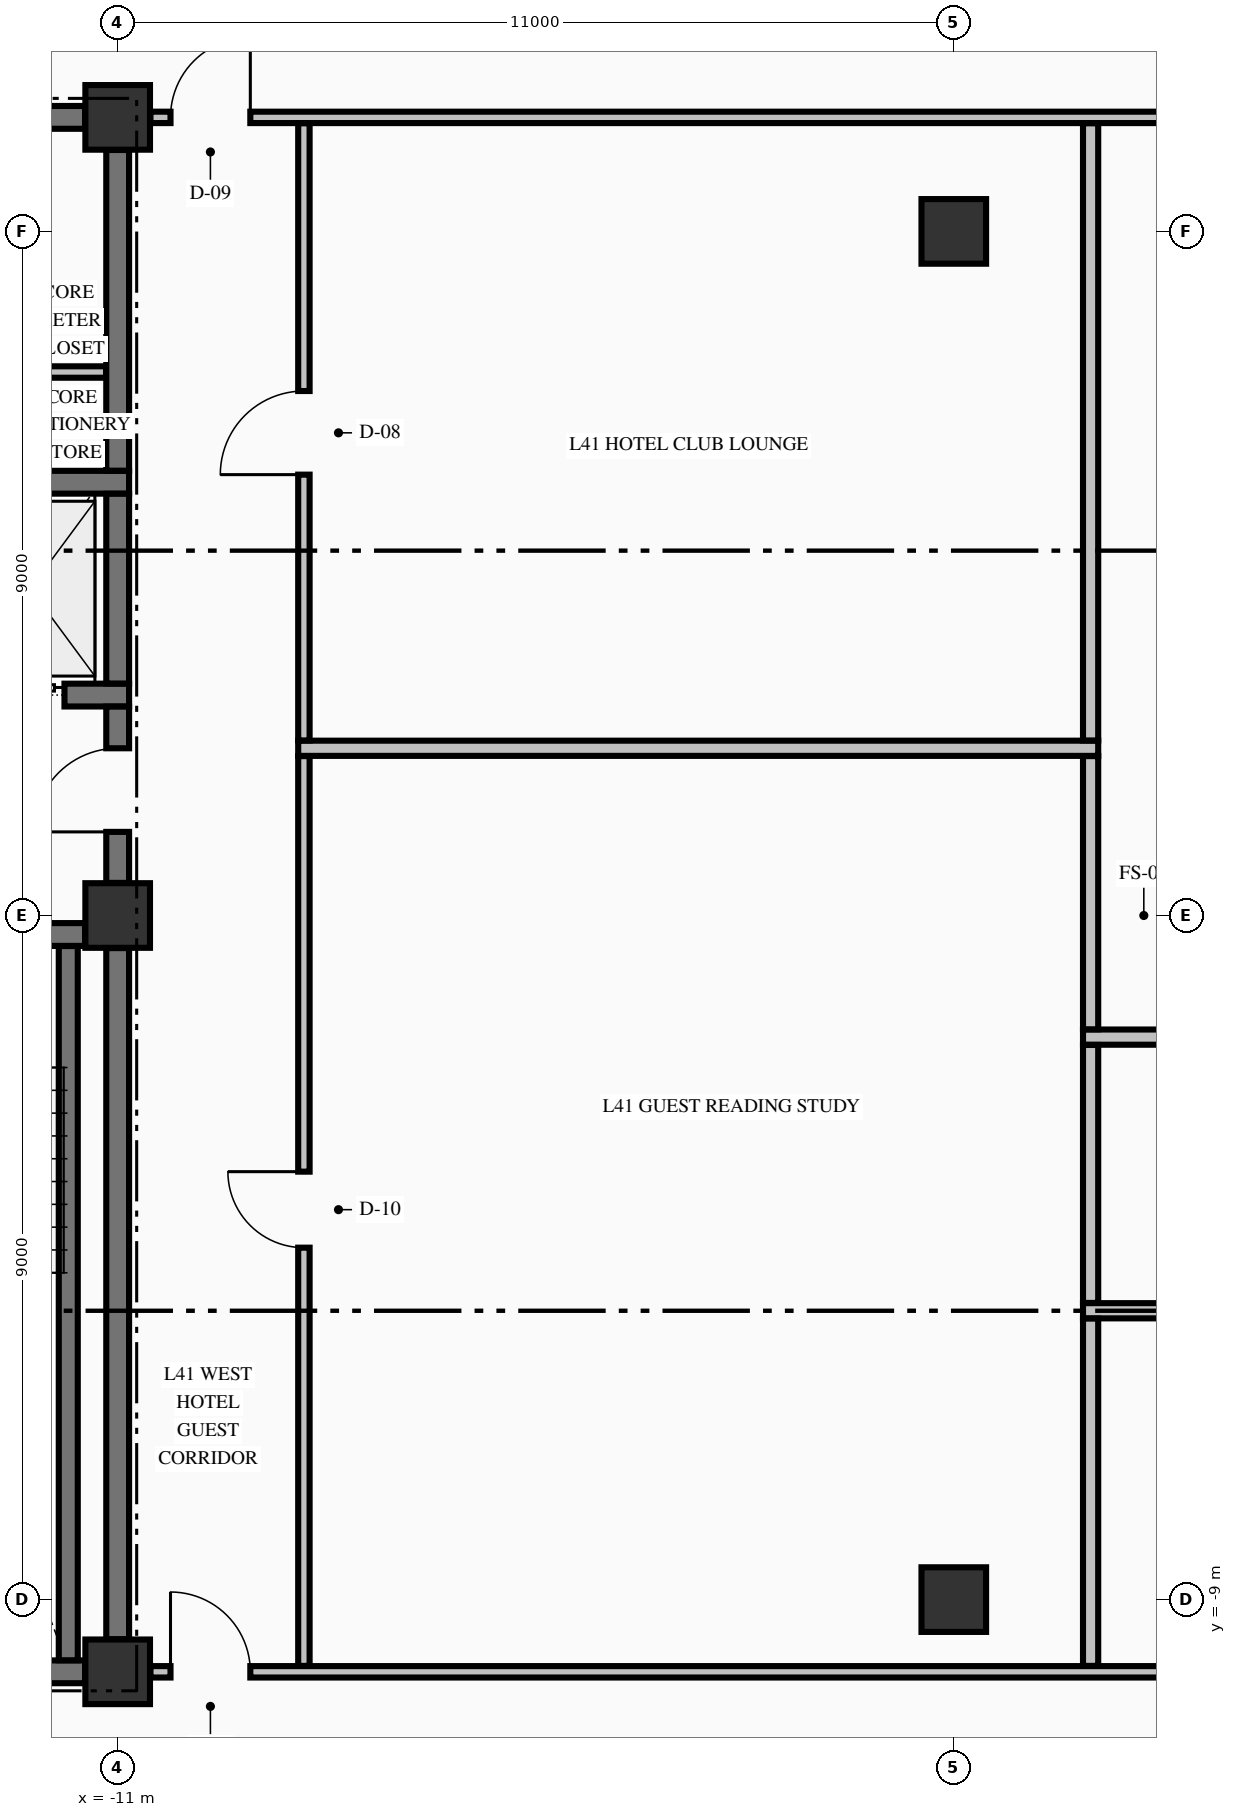
"""IFC4 building model, lengths in metres.
Left out: names, types, materials, properties, quantities, classifications, styles, units other than length and angle.
Written with IfcOpenShell. Run it as: python <this file> out.ifc"""

import sys

from ifc_helpers import new_model, si_unit, direction, frame, frame_2d, origin, origin_2d, place, context, subcontext, project, spatial, rectangle, extrude, element, fill, save


model = new_model("IFC4")
c1 = context("Model", 3, precision=1e-05, world=origin(), true_north=direction((0.0, 1.0)))
c2 = subcontext(c1, "Body", "Model", "MODEL_VIEW")
j1 = project(units=[si_unit("LENGTHUNIT", "METRE"), si_unit("PLANEANGLEUNIT", "RADIAN")], contexts=[c1])
p1 = place(None, origin())
s1 = spatial("IfcSite", under=j1, at=p1, CompositionType="ELEMENT")
p2 = place(p1, origin())
s2 = spatial("IfcBuilding", under=s1, at=p2, CompositionType="ELEMENT")
p3 = place(p2, frame((0.0, 0.0, 162.66)))
s3 = spatial("IfcBuildingStorey", under=s2, at=p3, CompositionType="ELEMENT", Elevation=162.66)
for number, where, z_axis, x_axis in (
    (1, (-11.0, -9.95, -0.25), (0.0, 0.0, 1.0), (1.0, 0.0, 0.0)),
    (2, (-11.0, 0.0, -0.25), (0.0, 0.0, 1.0), (1.0, 0.0, 0.0)),
    (3, (-11.0, 10.5, -0.25), (0.0, 0.0, 1.0), (1.0, 0.0, 0.0)),
    (4, (0.0, -9.0, -0.25), (0.0, 0.0, 1.0), (1.0, 0.0, 0.0)),
    (5, (0.0, 9.0, -0.25), (0.0, 0.0, 1.0), (1.0, 0.0, 0.0)),
):
    element("IfcColumn", number, at=place(p3, frame(where, z_axis=z_axis, x_axis=x_axis)), inside=s3, PredefinedType="COLUMN", context=c2, shape_type="SweptSolid", body=[
        extrude(rectangle(XDim=0.85, YDim=0.85, at=origin_2d()), origin(), (0.0, 0.0, 1.0), 3.4),
    ])
p4 = place(p3, frame((-14.7, -9.95, 0.0), z_axis=(0.0, 0.0, 1.0), x_axis=(1.0, 0.0, 0.0)))
e6 = element("IfcWall", 6, at=p4, inside=s3, PredefinedType="SHEAR", context=c2, shape_type="SweptSolid", body=[
    extrude(rectangle(XDim=3.271, YDim=0.3, at=frame_2d((1.635, 0.0))), origin(), (0.0, 0.0, 1.0), 3.15),
])
p5 = place(p3, frame((-19.571, -0.25, 0.0), z_axis=(0.0, 0.0, 1.0), x_axis=(1.0, 0.0, 0.0)))
e7 = element("IfcWall", 7, at=p5, inside=s3, PredefinedType="SHEAR", context=c2, shape_type="SweptSolid", body=[
    extrude(rectangle(XDim=8.142, YDim=0.3, at=frame_2d((4.071, 0.0))), origin(), (0.0, 0.0, 1.0), 3.15),
])
p6 = place(p5, frame((5.871, 0.0, 0.0)))
e8 = element("IfcOpeningElement", 8, at=p6, cuts=e7, PredefinedType="OPENING", context=c2, shape_type="SweptSolid", body=[
    extrude(rectangle(XDim=1.1, YDim=2.15, at=frame_2d((0.55, 1.075))), frame((0.0, 0.16, 0.0), z_axis=(0.0, -1.0, 0.0), x_axis=(1.0, 0.0, 0.0)), (0.0, 0.0, 1.0), 0.32),
])
p7 = place(p3, frame((-14.875, 2.9, 0.0), z_axis=(0.0, 0.0, 1.0), x_axis=(1.0, 0.0, 0.0)))
e9 = element("IfcWall", 9, at=p7, inside=s3, PredefinedType="SHEAR", context=c2, shape_type="SweptSolid", body=[
    extrude(rectangle(XDim=4.025, YDim=0.3, at=frame_2d((2.012, 0.0))), origin(), (0.0, 0.0, 1.0), 3.15),
])
p8 = place(p7, frame((2.075, 0.0, 0.0)))
e10 = element("IfcOpeningElement", 10, at=p8, cuts=e9, PredefinedType="OPENING", context=c2, shape_type="SweptSolid", body=[
    extrude(rectangle(XDim=1.1, YDim=2.2, at=frame_2d((0.55, 1.1))), frame((0.0, 0.16, 0.0), z_axis=(0.0, -1.0, 0.0), x_axis=(1.0, 0.0, 0.0)), (0.0, 0.0, 1.0), 0.32),
])
p9 = place(p3, frame((-14.875, 5.7, 0.0), z_axis=(0.0, 0.0, 1.0), x_axis=(1.0, 0.0, 0.0)))
e11 = element("IfcWall", 11, at=p9, inside=s3, PredefinedType="SHEAR", context=c2, shape_type="SweptSolid", body=[
    extrude(rectangle(XDim=4.025, YDim=0.3, at=frame_2d((2.012, 0.0))), origin(), (0.0, 0.0, 1.0), 3.15),
])
p10 = place(p3, frame((-14.7, 10.5, 0.0), z_axis=(0.0, 0.0, 1.0), x_axis=(1.0, 0.0, 0.0)))
e12 = element("IfcWall", 12, at=p10, inside=s3, PredefinedType="SHEAR", context=c2, shape_type="SweptSolid", body=[
    extrude(rectangle(XDim=3.271, YDim=0.3, at=frame_2d((1.635, 0.0))), origin(), (0.0, 0.0, 1.0), 3.15),
])
p11 = place(p10, frame((0.305, 0.0, 0.0)))
e13 = element("IfcOpeningElement", 13, at=p11, cuts=e12, PredefinedType="OPENING", context=c2, shape_type="SweptSolid", body=[
    extrude(rectangle(XDim=0.95, YDim=2.15, at=frame_2d((0.475, 1.075))), frame((0.0, 0.16, 0.0), z_axis=(0.0, -1.0, 0.0), x_axis=(1.0, 0.0, 0.0)), (0.0, 0.0, 1.0), 0.32),
])
p12 = place(p3, frame((-10.569, -9.95, 0.0), z_axis=(0.0, 0.0, 1.0), x_axis=(1.0, 0.0, 0.0)))
e14 = element("IfcWall", 14, at=p12, inside=s3, PredefinedType="PARTITIONING", context=c2, shape_type="SweptSolid", body=[
    extrude(rectangle(XDim=21.138, YDim=0.15, at=frame_2d((10.569, 0.0))), origin(), (0.0, 0.0, 1.0), 3.15),
])
p13 = place(p12, frame((0.264, 0.0, 0.0)))
e15 = element("IfcOpeningElement", 15, at=p13, cuts=e14, PredefinedType="OPENING", context=c2, shape_type="SweptSolid", body=[
    extrude(rectangle(XDim=1.05, YDim=2.15, at=frame_2d((0.525, 1.075))), frame((0.0, 0.085, 0.0), z_axis=(0.0, -1.0, 0.0), x_axis=(1.0, 0.0, 0.0)), (0.0, 0.0, 1.0), 0.17),
])
p14 = place(p12, frame((19.824, 0.0, 0.0)))
e16 = element("IfcOpeningElement", 16, at=p14, cuts=e14, PredefinedType="OPENING", context=c2, shape_type="SweptSolid", body=[
    extrude(rectangle(XDim=1.05, YDim=2.15, at=frame_2d((0.525, 1.075))), frame((0.0, 0.085, 0.0), z_axis=(0.0, -1.0, 0.0), x_axis=(1.0, 0.0, 0.0)), (0.0, 0.0, 1.0), 0.17),
])
p15 = place(p12, frame((13.774, 0.0, 0.0)))
e17 = element("IfcOpeningElement", 17, at=p15, cuts=e14, PredefinedType="OPENING", context=c2, shape_type="SweptSolid", body=[
    extrude(rectangle(XDim=0.95, YDim=2.15, at=frame_2d((0.475, 1.075))), frame((0.0, 0.085, 0.0), z_axis=(0.0, -1.0, 0.0), x_axis=(1.0, 0.0, 0.0)), (0.0, 0.0, 1.0), 0.17),
])
for number, where, z_axis, x_axis in (
    (18, (1.7, -5.2, 0.0), (0.0, 0.0, 1.0), (1.0, 0.0, 0.0)),
    (19, (1.7, -1.6, 0.0), (0.0, 0.0, 1.0), (1.0, 0.0, 0.0)),
):
    element("IfcWall", number, at=place(p3, frame(where, z_axis=z_axis, x_axis=x_axis)), inside=s3, PredefinedType="PARTITIONING", context=c2, shape_type="SweptSolid", body=[
        extrude(rectangle(XDim=6.925, YDim=0.2, at=frame_2d((3.462, 0.0))), origin(), (0.0, 0.0, 1.0), 3.15),
    ])
p16 = place(p3, frame((-8.625, 2.2, 0.0), z_axis=(0.0, 0.0, 1.0), x_axis=(1.0, 0.0, 0.0)))
e20 = element("IfcWall", 20, at=p16, inside=s3, PredefinedType="PARTITIONING", context=c2, shape_type="SweptSolid", body=[
    extrude(rectangle(XDim=10.525, YDim=0.2, at=frame_2d((5.262, 0.0))), origin(), (0.0, 0.0, 1.0), 3.15),
])
p17 = place(p3, frame((-13.225, 7.15, 0.0), z_axis=(0.0, 0.0, 1.0), x_axis=(1.0, 0.0, 0.0)))
e21 = element("IfcWall", 21, at=p17, inside=s3, PredefinedType="PARTITIONING", context=c2, shape_type="SweptSolid", body=[
    extrude(rectangle(XDim=2.072, YDim=0.15, at=frame_2d((1.036, 0.0))), origin(), (0.0, 0.0, 1.0), 3.15),
])
p18 = place(p3, frame((-10.569, 10.5, 0.0), z_axis=(0.0, 0.0, 1.0), x_axis=(1.0, 0.0, 0.0)))
e22 = element("IfcWall", 22, at=p18, inside=s3, PredefinedType="PARTITIONING", context=c2, shape_type="SweptSolid", body=[
    extrude(rectangle(XDim=21.138, YDim=0.15, at=frame_2d((10.569, 0.0))), origin(), (0.0, 0.0, 1.0), 3.15),
])
p19 = place(p18, frame((0.264, 0.0, 0.0)))
e23 = element("IfcOpeningElement", 23, at=p19, cuts=e22, PredefinedType="OPENING", context=c2, shape_type="SweptSolid", body=[
    extrude(rectangle(XDim=1.05, YDim=2.15, at=frame_2d((0.525, 1.075))), frame((0.0, 0.085, 0.0), z_axis=(0.0, -1.0, 0.0), x_axis=(1.0, 0.0, 0.0)), (0.0, 0.0, 1.0), 0.17),
])
p20 = place(p18, frame((19.824, 0.0, 0.0)))
e24 = element("IfcOpeningElement", 24, at=p20, cuts=e22, PredefinedType="OPENING", context=c2, shape_type="SweptSolid", body=[
    extrude(rectangle(XDim=1.05, YDim=2.15, at=frame_2d((0.525, 1.075))), frame((0.0, 0.085, 0.0), z_axis=(0.0, -1.0, 0.0), x_axis=(1.0, 0.0, 0.0)), (0.0, 0.0, 1.0), 0.17),
])
p21 = place(p3, frame((-11.65, -9.798, 0.0), z_axis=(0.0, 0.0, 1.0), x_axis=(0.0, 1.0, 0.0)))
e25 = element("IfcWall", 25, at=p21, inside=s3, PredefinedType="SOLIDWALL", context=c2, shape_type="SweptSolid", body=[
    extrude(rectangle(XDim=9.396, YDim=0.25, at=frame_2d((4.698, 0.0))), origin(), (0.0, 0.0, 1.0), 3.15),
])
p22 = place(p3, frame((-11.0, -9.521, 0.0), z_axis=(0.0, 0.0, 1.0), x_axis=(0.0, 1.0, 0.0)))
e26 = element("IfcWall", 26, at=p22, inside=s3, PredefinedType="SHEAR", context=c2, shape_type="SweptSolid", body=[
    extrude(rectangle(XDim=9.092, YDim=0.3, at=frame_2d((4.546, 0.0))), origin(), (0.0, 0.0, 1.0), 3.15),
])
p23 = place(p3, frame((-11.0, 0.429, 0.0), z_axis=(0.0, 0.0, 1.0), x_axis=(0.0, 1.0, 0.0)))
e27 = element("IfcWall", 27, at=p23, inside=s3, PredefinedType="SHEAR", context=c2, shape_type="SweptSolid", body=[
    extrude(rectangle(XDim=2.319, YDim=0.3, at=frame_2d((1.16, 0.0))), origin(), (0.0, 0.0, 1.0), 3.15),
])
p24 = place(p23, frame((0.671, 0.0, 0.0)))
e28 = element("IfcOpeningElement", 28, at=p24, cuts=e27, PredefinedType="OPENING", context=c2, shape_type="SweptSolid", body=[
    extrude(rectangle(XDim=1.1, YDim=2.15, at=frame_2d((0.55, 1.075))), frame((0.0, 0.16, 0.0), z_axis=(0.0, -1.0, 0.0), x_axis=(1.0, 0.0, 0.0)), (0.0, 0.0, 1.0), 0.32),
])
p25 = place(p3, frame((-11.0, 3.052, 0.0), z_axis=(0.0, 0.0, 1.0), x_axis=(0.0, 1.0, 0.0)))
e29 = element("IfcWall", 29, at=p25, inside=s3, PredefinedType="SHEAR", context=c2, shape_type="SweptSolid", body=[
    extrude(rectangle(XDim=2.496, YDim=0.3, at=frame_2d((1.248, 0.0))), origin(), (0.0, 0.0, 1.0), 3.15),
])
p26 = place(p3, frame((-11.0, 5.852, 0.0), z_axis=(0.0, 0.0, 1.0), x_axis=(0.0, 1.0, 0.0)))
e30 = element("IfcWall", 30, at=p26, inside=s3, PredefinedType="SHEAR", context=c2, shape_type="SweptSolid", body=[
    extrude(rectangle(XDim=4.219, YDim=0.3, at=frame_2d((2.109, 0.0))), origin(), (0.0, 0.0, 1.0), 3.15),
])
p27 = place(p3, frame((-8.55, -9.872, 0.0), z_axis=(0.0, 0.0, 1.0), x_axis=(0.0, 1.0, 0.0)))
e31 = element("IfcWall", 31, at=p27, inside=s3, PredefinedType="PARTITIONING", context=c2, shape_type="SweptSolid", body=[
    extrude(rectangle(XDim=11.969, YDim=0.15, at=frame_2d((5.984, 0.0))), origin(), (0.0, 0.0, 1.0), 3.15),
])
p28 = place(p27, frame((5.502, 0.0, 0.0)))
e32 = element("IfcOpeningElement", 32, at=p28, cuts=e31, PredefinedType="OPENING", context=c2, shape_type="SweptSolid", body=[
    extrude(rectangle(XDim=1.0, YDim=2.15, at=frame_2d((0.5, 1.075))), frame((0.0, 0.085, 0.0), z_axis=(0.0, -1.0, 0.0), x_axis=(1.0, 0.0, 0.0)), (0.0, 0.0, 1.0), 0.17),
])
p29 = place(p3, frame((-8.55, 2.303, 0.0), z_axis=(0.0, 0.0, 1.0), x_axis=(0.0, 1.0, 0.0)))
e33 = element("IfcWall", 33, at=p29, inside=s3, PredefinedType="PARTITIONING", context=c2, shape_type="SweptSolid", body=[
    extrude(rectangle(XDim=8.119, YDim=0.15, at=frame_2d((4.06, 0.0))), origin(), (0.0, 0.0, 1.0), 3.15),
])
p30 = place(p29, frame((3.497, 0.0, 0.0)))
e34 = element("IfcOpeningElement", 34, at=p30, cuts=e33, PredefinedType="OPENING", context=c2, shape_type="SweptSolid", body=[
    extrude(rectangle(XDim=1.1, YDim=2.15, at=frame_2d((0.55, 1.075))), frame((0.0, 0.085, 0.0), z_axis=(0.0, -1.0, 0.0), x_axis=(1.0, 0.0, 0.0)), (0.0, 0.0, 1.0), 0.17),
])
p31 = place(p3, frame((1.8, -9.872, 0.0), z_axis=(0.0, 0.0, 1.0), x_axis=(0.0, 1.0, 0.0)))
e35 = element("IfcWall", 35, at=p31, inside=s3, PredefinedType="PARTITIONING", context=c2, shape_type="SweptSolid", body=[
    extrude(rectangle(XDim=4.569, YDim=0.2, at=frame_2d((2.285, 0.0))), origin(), (0.0, 0.0, 1.0), 3.15),
])
p32 = place(p3, frame((1.8, -5.097, 0.0), z_axis=(0.0, 0.0, 1.0), x_axis=(0.0, 1.0, 0.0)))
e36 = element("IfcWall", 36, at=p32, inside=s3, PredefinedType="PARTITIONING", context=c2, shape_type="SweptSolid", body=[
    extrude(rectangle(XDim=3.394, YDim=0.2, at=frame_2d((1.697, 0.0))), origin(), (0.0, 0.0, 1.0), 3.15),
])
p33 = place(p3, frame((1.8, -1.497, 0.0), z_axis=(0.0, 0.0, 1.0), x_axis=(0.0, 1.0, 0.0)))
e37 = element("IfcWall", 37, at=p33, inside=s3, PredefinedType="PARTITIONING", context=c2, shape_type="SweptSolid", body=[
    extrude(rectangle(XDim=3.594, YDim=0.2, at=frame_2d((1.797, 0.0))), origin(), (0.0, 0.0, 1.0), 3.15),
])
p34 = place(p3, frame((1.8, 2.303, 0.0), z_axis=(0.0, 0.0, 1.0), x_axis=(0.0, 1.0, 0.0)))
e38 = element("IfcWall", 38, at=p34, inside=s3, PredefinedType="PARTITIONING", context=c2, shape_type="SweptSolid", body=[
    extrude(rectangle(XDim=8.119, YDim=0.2, at=frame_2d((4.06, 0.0))), origin(), (0.0, 0.0, 1.0), 3.15),
])
p35 = place(p24, origin())
e39 = element("IfcDoor", 39, at=p35, inside=s3, OperationType="SINGLE_SWING_LEFT", PredefinedType="DOOR", context=c2, shape_type="SweptSolid", body=[
    extrude(rectangle(XDim=1.1, YDim=2.15, at=frame_2d((0.55, 1.075))), frame((0.0, 0.025, 0.0), z_axis=(0.0, -1.0, 0.0), x_axis=(1.0, 0.0, 0.0)), (0.0, 0.0, 1.0), 0.05),
])
fill(e28, e39)
p36 = place(p8, origin())
e40 = element("IfcDoor", 40, at=p36, inside=s3, OperationType="SLIDING_TO_LEFT", PredefinedType="DOOR", context=c2, shape_type="SweptSolid", body=[
    extrude(rectangle(XDim=1.1, YDim=2.2, at=frame_2d((0.55, 1.1))), frame((0.0, 0.025, 0.0), z_axis=(0.0, -1.0, 0.0), x_axis=(1.0, 0.0, 0.0)), (0.0, 0.0, 1.0), 0.05),
])
fill(e10, e40)
p37 = place(p19, origin())
e41 = element("IfcDoor", 41, at=p37, inside=s3, OperationType="SINGLE_SWING_RIGHT", PredefinedType="DOOR", context=c2, shape_type="SweptSolid", body=[
    extrude(rectangle(XDim=1.05, YDim=2.15, at=frame_2d((0.525, 1.075))), frame((0.0, 0.025, 0.0), z_axis=(0.0, -1.0, 0.0), x_axis=(1.0, 0.0, 0.0)), (0.0, 0.0, 1.0), 0.05),
])
fill(e23, e41)
p38 = place(p13, origin())
e42 = element("IfcDoor", 42, at=p38, inside=s3, OperationType="SINGLE_SWING_LEFT", PredefinedType="DOOR", context=c2, shape_type="SweptSolid", body=[
    extrude(rectangle(XDim=1.05, YDim=2.15, at=frame_2d((0.525, 1.075))), frame((0.0, 0.025, 0.0), z_axis=(0.0, -1.0, 0.0), x_axis=(1.0, 0.0, 0.0)), (0.0, 0.0, 1.0), 0.05),
])
fill(e15, e42)
p39 = place(p30, origin())
e43 = element("IfcDoor", 43, at=p39, inside=s3, OperationType="SINGLE_SWING_LEFT", PredefinedType="DOOR", context=c2, shape_type="SweptSolid", body=[
    extrude(rectangle(XDim=1.1, YDim=2.15, at=frame_2d((0.55, 1.075))), frame((0.0, 0.025, 0.0), z_axis=(0.0, -1.0, 0.0), x_axis=(1.0, 0.0, 0.0)), (0.0, 0.0, 1.0), 0.05),
])
fill(e34, e43)
p40 = place(p28, origin())
e44 = element("IfcDoor", 44, at=p40, inside=s3, OperationType="SINGLE_SWING_RIGHT", PredefinedType="DOOR", context=c2, shape_type="SweptSolid", body=[
    extrude(rectangle(XDim=1.0, YDim=2.15, at=frame_2d((0.5, 1.075))), frame((0.0, 0.025, 0.0), z_axis=(0.0, -1.0, 0.0), x_axis=(1.0, 0.0, 0.0)), (0.0, 0.0, 1.0), 0.05),
])
fill(e32, e44)
save(model, sys.argv[1])
